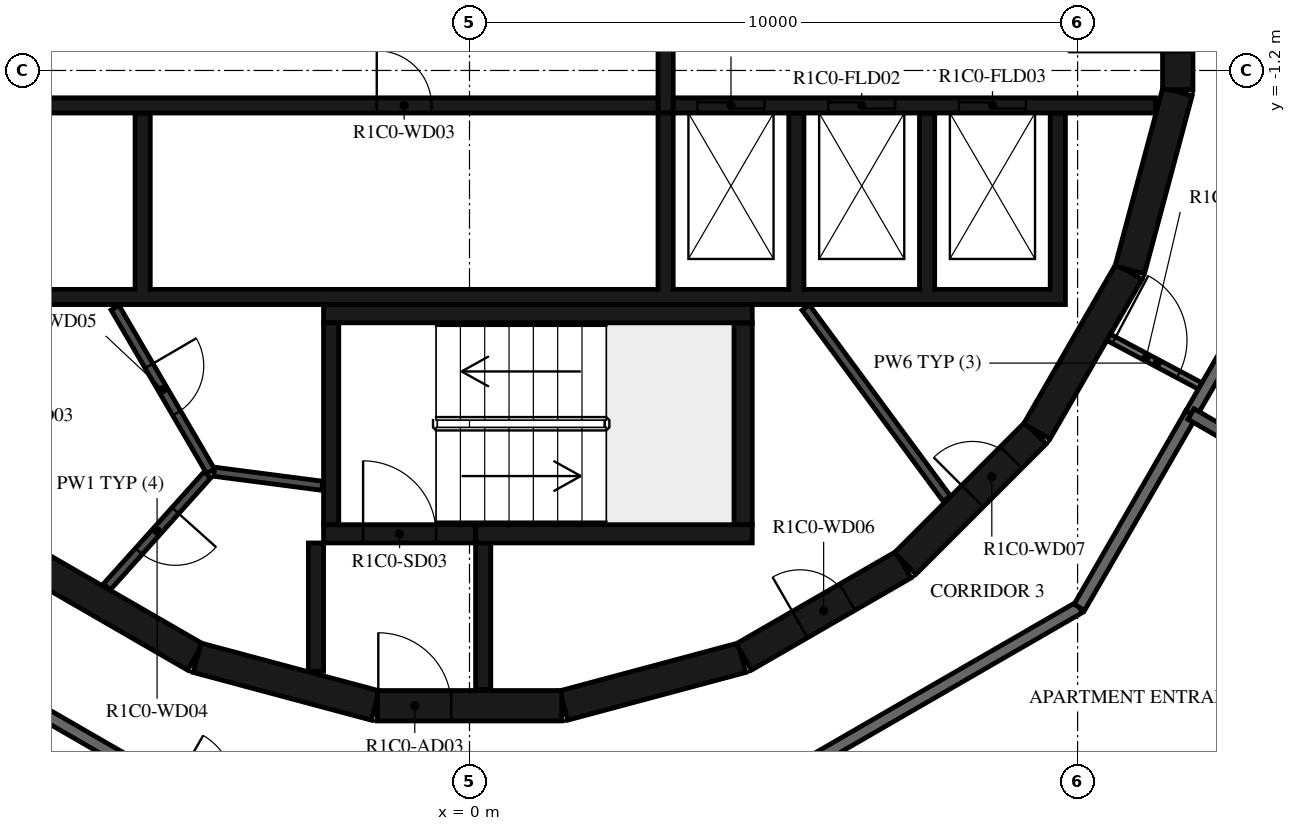
"""IFC4 building model, lengths in metres.
Left out: names, types, materials, properties, quantities, classifications, styles, units other than length and angle.
Written with IfcOpenShell. Run it as: python <this file> out.ifc"""

import sys

from ifc_helpers import new_model, si_unit, direction, frame, frame_2d, origin, place, context, subcontext, project, spatial, polyline, rectangle, outline, extrude, element, fill, save


model = new_model("IFC4")
c1 = context("Model", 3, precision=1e-05, world=origin(), true_north=direction((0.0, 1.0)))
c2 = subcontext(c1, "Body", "Model", "MODEL_VIEW")
j1 = project(units=[si_unit("LENGTHUNIT", "METRE"), si_unit("PLANEANGLEUNIT", "RADIAN")], contexts=[c1])
p1 = place(None, origin())
s1 = spatial("IfcSite", under=j1, at=p1, CompositionType="ELEMENT")
p2 = place(p1, origin())
s2 = spatial("IfcBuilding", under=s1, at=p2, CompositionType="ELEMENT")
p3 = place(p2, frame((0.0, 0.0, 66.4)))
s3 = spatial("IfcBuildingStorey", under=s2, at=p3, CompositionType="ELEMENT", Elevation=66.4)
p4 = place(p3, frame((1.55, -11.643, 0.0), z_axis=(0.0, 0.0, 1.0), x_axis=(0.965948410781, 0.258734743916, 0.0)))
e1 = element("IfcWall", 1, at=p4, inside=s3, PredefinedType="SHEAR", context=c2, shape_type="SweptSolid", body=[
    extrude(rectangle(XDim=3.033, YDim=0.5, at=frame_2d((1.516, 0.0))), origin(), (0.0, 0.0, 1.0), 3.05),
])
p5 = place(p3, frame((4.51, -10.845, 0.0), z_axis=(0.0, 0.0, 1.0), x_axis=(0.865975092491, 0.500087131594, 0.0)))
e2 = element("IfcWall", 2, at=p5, inside=s3, PredefinedType="SHEAR", context=c2, shape_type="SweptSolid", body=[
    extrude(rectangle(XDim=3.033, YDim=0.5, at=frame_2d((1.516, 0.0))), origin(), (0.0, 0.0, 1.0), 3.05),
])
p6 = place(p5, frame((1.066, 0.0, 0.0)))
e3 = element("IfcOpeningElement", 3, at=p6, cuts=e2, PredefinedType="OPENING", context=c2, shape_type="SweptSolid", body=[
    extrude(rectangle(XDim=0.9, YDim=2.1, at=frame_2d((0.45, 1.05))), frame((0.0, 0.26, 0.0), z_axis=(0.0, -1.0, 0.0), x_axis=(1.0, 0.0, 0.0)), (0.0, 0.0, 1.0), 0.52),
])
p7 = place(p3, frame((7.164, -9.308, 0.0), z_axis=(0.0, 0.0, 1.0), x_axis=(0.707106781187, 0.707106781187, 0.0)))
e4 = element("IfcWall", 4, at=p7, inside=s3, PredefinedType="SHEAR", context=c2, shape_type="SweptSolid", body=[
    extrude(rectangle(XDim=3.032, YDim=0.5, at=frame_2d((1.516, 0.0))), origin(), (0.0, 0.0, 1.0), 3.05),
])
p8 = place(p7, frame((1.566, 0.0, 0.0)))
e5 = element("IfcOpeningElement", 5, at=p8, cuts=e4, PredefinedType="OPENING", context=c2, shape_type="SweptSolid", body=[
    extrude(rectangle(XDim=0.9, YDim=2.1, at=frame_2d((0.45, 1.05))), frame((0.0, 0.26, 0.0), z_axis=(0.0, -1.0, 0.0), x_axis=(1.0, 0.0, 0.0)), (0.0, 0.0, 1.0), 0.52),
])
for number, where, z_axis, x_axis in (
    (6, (9.329, -7.137, 0.0), (0.0, 0.0, 1.0), (0.5, 0.866, 0.0)),
    (7, (10.858, -4.479, 0.0), (0.0, 0.0, 1.0), (0.259, 0.966, 0.0)),
):
    element("IfcWall", number, at=place(p3, frame(where, z_axis=z_axis, x_axis=x_axis)), inside=s3, PredefinedType="SHEAR", context=c2, shape_type="SweptSolid", body=[
        extrude(rectangle(XDim=3.033, YDim=0.5, at=frame_2d((1.516, 0.0))), origin(), (0.0, 0.0, 1.0), 3.05),
    ])
p9 = place(p3, frame((11.647, -1.516, 0.0), z_axis=(0.0, 0.0, 1.0), x_axis=(0.0, 1.0, 0.0)))
e8 = element("IfcWall", 8, at=p9, inside=s3, PredefinedType="SHEAR", context=c2, shape_type="SweptSolid", body=[
    extrude(rectangle(XDim=3.033, YDim=0.5, at=frame_2d((1.516, 0.0))), origin(), (0.0, 0.0, 1.0), 3.05),
])
p10 = place(p9, frame((0.616, 0.0, 0.0)))
e9 = element("IfcOpeningElement", 9, at=p10, cuts=e8, PredefinedType="OPENING", context=c2, shape_type="SweptSolid", body=[
    extrude(rectangle(XDim=1.8, YDim=2.1, at=frame_2d((0.9, 1.05))), frame((0.0, 0.26, 0.0), z_axis=(0.0, -1.0, 0.0), x_axis=(1.0, 0.0, 0.0)), (0.0, 0.0, 1.0), 0.52),
])
for number, where, z_axis, x_axis in (
    (10, (-7.137, -9.329, 0.0), (0.0, 0.0, 1.0), (0.866, -0.5, 0.0)),
    (11, (-4.479, -10.858, 0.0), (0.0, 0.0, 1.0), (0.966, -0.259, 0.0)),
):
    element("IfcWall", number, at=place(p3, frame(where, z_axis=z_axis, x_axis=x_axis)), inside=s3, PredefinedType="SHEAR", context=c2, shape_type="SweptSolid", body=[
        extrude(rectangle(XDim=3.033, YDim=0.5, at=frame_2d((1.516, 0.0))), origin(), (0.0, 0.0, 1.0), 3.05),
    ])
p11 = place(p3, frame((-1.516, -11.647, 0.0), z_axis=(0.0, 0.0, 1.0), x_axis=(1.0, 0.0, 0.0)))
e12 = element("IfcWall", 12, at=p11, inside=s3, PredefinedType="SHEAR", context=c2, shape_type="SweptSolid", body=[
    extrude(rectangle(XDim=3.033, YDim=0.5, at=frame_2d((1.516, 0.0))), origin(), (0.0, 0.0, 1.0), 3.05),
])
p12 = place(p11, frame((0.016, 0.0, 0.0)))
e13 = element("IfcOpeningElement", 13, at=p12, cuts=e12, PredefinedType="OPENING", context=c2, shape_type="SweptSolid", body=[
    extrude(rectangle(XDim=1.2, YDim=2.1, at=frame_2d((0.6, 1.05))), frame((0.0, 0.26, 0.0), z_axis=(0.0, -1.0, 0.0), x_axis=(1.0, 0.0, 0.0)), (0.0, 0.0, 1.0), 0.52),
])
p13 = place(p3, frame((-2.275, -8.67, 0.0), z_axis=(0.0, 0.0, 1.0), x_axis=(0.0, 1.0, 0.0)))
e14 = element("IfcWall", 14, at=p13, inside=s3, PredefinedType="SHEAR", context=c2, shape_type="SweptSolid", body=[
    extrude(rectangle(XDim=3.32, YDim=0.25, at=frame_2d((1.66, 0.0))), origin(), (0.0, 0.0, 1.0), 3.05),
])
p14 = place(p3, frame((-2.4, -5.2, 0.0), z_axis=(0.0, 0.0, 1.0), x_axis=(1.0, 0.0, 0.0)))
e15 = element("IfcWall", 15, at=p14, inside=s3, PredefinedType="SHEAR", context=c2, shape_type="SweptSolid", body=[
    extrude(rectangle(XDim=7.05, YDim=0.3, at=frame_2d((3.525, 0.0))), origin(), (0.0, 0.0, 1.0), 3.05),
])
p15 = place(p3, frame((4.5, -8.67, 0.0), z_axis=(0.0, 0.0, 1.0), x_axis=(0.0, 1.0, 0.0)))
e16 = element("IfcWall", 16, at=p15, inside=s3, PredefinedType="SHEAR", context=c2, shape_type="SweptSolid", body=[
    extrude(rectangle(XDim=3.32, YDim=0.3, at=frame_2d((1.66, 0.0))), origin(), (0.0, 0.0, 1.0), 3.05),
])
p16 = place(p3, frame((0.1, -8.82, 0.0), z_axis=(0.0, 0.0, 1.0), x_axis=(1.0, 0.0, 0.0)))
e17 = element("IfcWall", 17, at=p16, inside=s3, PredefinedType="SHEAR", context=c2, shape_type="SweptSolid", body=[
    extrude(rectangle(XDim=4.55, YDim=0.3, at=frame_2d((2.275, 0.0))), origin(), (0.0, 0.0, 1.0), 3.05),
])
p17 = place(p3, frame((-2.4, -8.82, 0.0), z_axis=(0.0, 0.0, 1.0), x_axis=(1.0, 0.0, 0.0)))
e18 = element("IfcWall", 18, at=p17, inside=s3, PredefinedType="SHEAR", context=c2, shape_type="SweptSolid", body=[
    extrude(rectangle(XDim=2.5, YDim=0.3, at=frame_2d((1.25, 0.0))), origin(), (0.0, 0.0, 1.0), 3.05),
])
p18 = place(p17, frame((0.65, 0.0, 0.0)))
e19 = element("IfcOpeningElement", 19, at=p18, cuts=e18, PredefinedType="OPENING", context=c2, shape_type="SweptSolid", body=[
    extrude(rectangle(XDim=1.2, YDim=2.1, at=frame_2d((0.6, 1.05))), frame((0.0, 0.16, 0.0), z_axis=(0.0, -1.0, 0.0), x_axis=(1.0, 0.0, 0.0)), (0.0, 0.0, 1.0), 0.32),
])
p19 = place(p3, frame((-2.525, -8.97, 0.0), z_axis=(0.0, 0.0, 1.0), x_axis=(0.0, -1.0, 0.0)))
e20 = element("IfcWall", 20, at=p19, inside=s3, PredefinedType="SHEAR", context=c2, shape_type="SweptSolid", body=[
    extrude(rectangle(XDim=2.11, YDim=0.25, at=frame_2d((1.055, 0.0))), origin(), (0.0, 0.0, 1.0), 3.05),
])
p20 = place(p3, frame((0.225, -8.97, 0.0), z_axis=(0.0, 0.0, 1.0), x_axis=(0.0, -1.0, 0.0)))
e21 = element("IfcWall", 21, at=p20, inside=s3, PredefinedType="SHEAR", context=c2, shape_type="SweptSolid", body=[
    extrude(rectangle(XDim=2.41, YDim=0.25, at=frame_2d((1.205, 0.0))), origin(), (0.0, 0.0, 1.0), 3.05),
])
p21 = place(p3, origin())
e22 = element("IfcWall", 22, at=p21, inside=s3, PredefinedType="SHEAR", context=c2, shape_type="SweptSolid", body=[
    extrude(outline(polyline([(9.8, -5.05), (9.8, -4.8), (9.8, -1.9), (9.55, -1.9), (9.55, -4.8), (7.65, -4.8), (7.65, -1.9), (7.4, -1.9), (7.4, -4.8), (5.5, -4.8), (5.5, -1.9), (5.25, -1.9), (5.25, -4.8), (3.35, -4.8), (3.35, -1.9), (3.1, -1.9), (3.1, -4.8), (-5.25, -4.8), (-5.25, -1.9), (-5.5, -1.9), (-5.5, -4.8), (-7.4, -4.8), (-7.4, -1.9), (-7.65, -1.9), (-7.65, -4.8), (-9.55, -4.8), (-9.55, -1.9), (-9.8, -1.9), (-9.8, -4.8), (-9.8, -5.05), (9.8, -5.05)])), origin(), (0.0, 0.0, 1.0), 3.05),
])
p22 = place(p3, frame((-11.28, -1.775, 0.0), z_axis=(0.0, 0.0, 1.0), x_axis=(1.0, 0.0, 0.0)))
e23 = element("IfcWall", 23, at=p22, inside=s3, PredefinedType="SHEAR", context=c2, shape_type="SweptSolid", body=[
    extrude(rectangle(XDim=14.38, YDim=0.25, at=frame_2d((7.19, 0.0))), origin(), (0.0, 0.0, 1.0), 3.05),
])
p23 = place(p22, frame((9.755, 0.0, 0.0)))
e24 = element("IfcOpeningElement", 24, at=p23, cuts=e23, PredefinedType="OPENING", context=c2, shape_type="SweptSolid", body=[
    extrude(rectangle(XDim=0.9, YDim=2.1, at=frame_2d((0.45, 1.05))), frame((0.0, 0.135, 0.0), z_axis=(0.0, -1.0, 0.0), x_axis=(1.0, 0.0, 0.0)), (0.0, 0.0, 1.0), 0.27),
])
p24 = place(p3, frame((3.35, -1.775, 0.0), z_axis=(0.0, 0.0, 1.0), x_axis=(1.0, 0.0, 0.0)))
e25 = element("IfcWall", 25, at=p24, inside=s3, PredefinedType="SHEAR", context=c2, shape_type="SweptSolid", body=[
    extrude(rectangle(XDim=7.93, YDim=0.25, at=frame_2d((3.965, 0.0))), origin(), (0.0, 0.0, 1.0), 3.05),
])
p25 = place(p24, frame((0.4, 0.0, 0.0)))
e26 = element("IfcOpeningElement", 26, at=p25, cuts=e25, PredefinedType="OPENING", context=c2, shape_type="SweptSolid", body=[
    extrude(rectangle(XDim=1.1, YDim=2.4, at=frame_2d((0.55, 1.2))), frame((0.0, 0.135, 0.0), z_axis=(0.0, -1.0, 0.0), x_axis=(1.0, 0.0, 0.0)), (0.0, 0.0, 1.0), 0.27),
])
p26 = place(p24, frame((2.55, 0.0, 0.0)))
e27 = element("IfcOpeningElement", 27, at=p26, cuts=e25, PredefinedType="OPENING", context=c2, shape_type="SweptSolid", body=[
    extrude(rectangle(XDim=1.1, YDim=2.4, at=frame_2d((0.55, 1.2))), frame((0.0, 0.135, 0.0), z_axis=(0.0, -1.0, 0.0), x_axis=(1.0, 0.0, 0.0)), (0.0, 0.0, 1.0), 0.27),
])
p27 = place(p24, frame((4.7, 0.0, 0.0)))
e28 = element("IfcOpeningElement", 28, at=p27, cuts=e25, PredefinedType="OPENING", context=c2, shape_type="SweptSolid", body=[
    extrude(rectangle(XDim=1.1, YDim=2.4, at=frame_2d((0.55, 1.2))), frame((0.0, 0.135, 0.0), z_axis=(0.0, -1.0, 0.0), x_axis=(1.0, 0.0, 0.0)), (0.0, 0.0, 1.0), 0.27),
])
p28 = place(p3, frame((3.225, -1.9, 0.0), z_axis=(0.0, 0.0, 1.0), x_axis=(0.0, 1.0, 0.0)))
e29 = element("IfcWall", 29, at=p28, inside=s3, PredefinedType="SHEAR", context=c2, shape_type="SweptSolid", body=[
    extrude(rectangle(XDim=3.8, YDim=0.25, at=frame_2d((1.9, 0.0))), origin(), (0.0, 0.0, 1.0), 3.05),
])
p29 = place(p3, frame((5.528, -5.098, 0.0), z_axis=(0.0, 0.0, 1.0), x_axis=(0.594034318069, -0.804439698769, 0.0)))
e30 = element("IfcWall", 30, at=p29, inside=s3, PredefinedType="PARTITIONING", context=c2, shape_type="SweptSolid", body=[
    extrude(rectangle(XDim=3.907, YDim=0.15, at=frame_2d((1.953, 0.0))), origin(), (0.0, 0.0, 1.0), 3.05),
])
p30 = place(p3, frame((-5.829, -5.102, 0.0), z_axis=(0.0, 0.0, 1.0), x_axis=(0.504480008384, -0.863423373057, 0.0)))
e31 = element("IfcWall", 31, at=p30, inside=s3, PredefinedType="PARTITIONING", context=c2, shape_type="SweptSolid", body=[
    extrude(rectangle(XDim=3.115, YDim=0.15, at=frame_2d((1.558, 0.0))), origin(), (0.0, 0.0, 1.0), 3.05),
])
p31 = place(p30, frame((1.107, 0.0, 0.0)))
e32 = element("IfcOpeningElement", 32, at=p31, cuts=e31, PredefinedType="OPENING", context=c2, shape_type="SweptSolid", body=[
    extrude(rectangle(XDim=0.9, YDim=2.1, at=frame_2d((0.45, 1.05))), frame((0.0, 0.085, 0.0), z_axis=(0.0, -1.0, 0.0), x_axis=(1.0, 0.0, 0.0)), (0.0, 0.0, 1.0), 0.17),
])
p32 = place(p3, frame((-4.311, -7.851, 0.0), z_axis=(0.0, 0.0, 1.0), x_axis=(-0.667869133096, -0.744278725383, 0.0)))
e33 = element("IfcWall", 33, at=p32, inside=s3, PredefinedType="PARTITIONING", context=c2, shape_type="SweptSolid", body=[
    extrude(rectangle(XDim=2.476, YDim=0.15, at=frame_2d((1.238, 0.0))), origin(), (0.0, 0.0, 1.0), 3.05),
])
p33 = place(p32, frame((0.788, 0.0, 0.0)))
e34 = element("IfcOpeningElement", 34, at=p33, cuts=e33, PredefinedType="OPENING", context=c2, shape_type="SweptSolid", body=[
    extrude(rectangle(XDim=0.9, YDim=2.1, at=frame_2d((0.45, 1.05))), frame((0.0, 0.085, 0.0), z_axis=(0.0, -1.0, 0.0), x_axis=(1.0, 0.0, 0.0)), (0.0, 0.0, 1.0), 0.17),
])
p34 = place(p3, frame((-4.198, -7.799, 0.0), z_axis=(0.0, 0.0, 1.0), x_axis=(0.991686747293, -0.128675542523, 0.0)))
e35 = element("IfcWall", 35, at=p34, inside=s3, PredefinedType="PARTITIONING", context=c2, shape_type="SweptSolid", body=[
    extrude(rectangle(XDim=1.793, YDim=0.15, at=frame_2d((0.896, 0.0))), origin(), (0.0, 0.0, 1.0), 3.05),
])
p35 = place(p3, frame((10.511, -5.589, 0.0), z_axis=(0.0, 0.0, 1.0), x_axis=(0.88294043061, -0.469485032769, 0.0)))
e36 = element("IfcWall", 36, at=p35, inside=s3, PredefinedType="PARTITIONING", context=c2, shape_type="SweptSolid", body=[
    extrude(rectangle(XDim=1.804, YDim=0.12, at=frame_2d((0.902, 0.0))), origin(), (0.0, 0.0, 1.0), 3.05),
])
p36 = place(p35, frame((0.1, 0.0, 0.0)))
e37 = element("IfcOpeningElement", 37, at=p36, cuts=e36, PredefinedType="OPENING", context=c2, shape_type="SweptSolid", body=[
    extrude(rectangle(XDim=1.2, YDim=2.1, at=frame_2d((0.6, 1.05))), frame((0.0, 0.07, 0.0), z_axis=(0.0, -1.0, 0.0), x_axis=(1.0, 0.0, 0.0)), (0.0, 0.0, 1.0), 0.14),
])
p37 = place(p3, frame((11.865, -6.85, 0.0), z_axis=(0.0, 0.0, 1.0), x_axis=(0.499987270552, 0.86603275301, 0.0)))
e38 = element("IfcWall", 38, at=p37, inside=s3, PredefinedType="STANDARD", context=c2, shape_type="SweptSolid", body=[
    extrude(rectangle(XDim=3.671, YDim=0.2, at=frame_2d((1.835, 0.0))), origin(), (0.0, 0.0, 1.0), 3.05),
])
p38 = place(p3, frame((-10.029, -10.029, 0.0), z_axis=(0.0, 0.0, 1.0), x_axis=(0.866022878987, -0.500004373052, 0.0)))
e39 = element("IfcWall", 39, at=p38, inside=s3, PredefinedType="STANDARD", context=c2, shape_type="SweptSolid", body=[
    extrude(rectangle(XDim=7.146, YDim=0.2, at=frame_2d((3.573, 0.0))), origin(), (0.0, 0.0, 1.0), 3.05),
])
p39 = place(p38, frame((5.947, 0.0, 0.0)))
e40 = element("IfcOpeningElement", 40, at=p39, cuts=e39, PredefinedType="OPENING", context=c2, shape_type="SweptSolid", body=[
    extrude(rectangle(XDim=1.0, YDim=2.1, at=frame_2d((0.5, 1.05))), frame((0.0, 0.11, 0.0), z_axis=(0.0, -1.0, 0.0), x_axis=(1.0, 0.0, 0.0)), (0.0, 0.0, 1.0), 0.22),
])
p40 = place(p3, frame((3.671, -13.7, 0.0), z_axis=(0.0, 0.0, 1.0), x_axis=(0.866024439905, 0.500001669485, 0.0)))
e41 = element("IfcWall", 41, at=p40, inside=s3, PredefinedType="STANDARD", context=c2, shape_type="SweptSolid", body=[
    extrude(rectangle(XDim=7.342, YDim=0.2, at=frame_2d((3.671, 0.0))), origin(), (0.0, 0.0, 1.0), 3.05),
])
p41 = place(p3, frame((10.029, -10.029, 0.0), z_axis=(0.0, 0.0, 1.0), x_axis=(0.50001606911, 0.866016126081, 0.0)))
e42 = element("IfcWall", 42, at=p41, inside=s3, PredefinedType="STANDARD", context=c2, shape_type="SweptSolid", body=[
    extrude(rectangle(XDim=3.671, YDim=0.2, at=frame_2d((1.835, 0.0))), origin(), (0.0, 0.0, 1.0), 3.05),
])
p42 = place(p3, frame((16.817, -9.709, 0.0), z_axis=(0.0, 0.0, 1.0), x_axis=(-0.86604338933, 0.499968846828, 0.0)))
e43 = element("IfcWall", 43, at=p42, inside=s3, PredefinedType="STANDARD", context=c2, shape_type="SweptSolid", body=[
    extrude(rectangle(XDim=5.718, YDim=0.2, at=frame_2d((2.859, 0.0))), origin(), (0.0, 0.0, 1.0), 3.05),
])
p43 = place(p3, frame((-11.127, -11.127, 0.0), z_axis=(0.0, 0.0, 1.0), x_axis=(0.866034514313, -0.499984219769, 0.0)))
e44 = element("IfcWall", 44, at=p43, inside=s3, PredefinedType="PARTITIONING", context=c2, shape_type="SweptSolid", body=[
    extrude(rectangle(XDim=5.006, YDim=0.12, at=frame_2d((2.503, 0.0))), origin(), (0.0, 0.0, 1.0), 3.05),
])
p44 = place(p43, frame((0.2, 0.0, 0.0)))
e45 = element("IfcOpeningElement", 45, at=p44, cuts=e44, PredefinedType="OPENING", context=c2, shape_type="SweptSolid", body=[
    extrude(rectangle(XDim=0.9, YDim=2.1, at=frame_2d((0.45, 1.05))), frame((0.0, 0.07, 0.0), z_axis=(0.0, -1.0, 0.0), x_axis=(1.0, 0.0, 0.0)), (0.0, 0.0, 1.0), 0.14),
])
p45 = place(p18, origin())
e46 = element("IfcDoor", 46, at=p45, inside=s3, OperationType="SINGLE_SWING_LEFT", PredefinedType="DOOR", context=c2, shape_type="SweptSolid", body=[
    extrude(rectangle(XDim=1.2, YDim=2.1, at=frame_2d((0.6, 1.05))), frame((0.0, 0.025, 0.0), z_axis=(0.0, -1.0, 0.0), x_axis=(1.0, 0.0, 0.0)), (0.0, 0.0, 1.0), 0.05),
])
fill(e19, e46)
p46 = place(p12, origin())
e47 = element("IfcDoor", 47, at=p46, inside=s3, OperationType="SINGLE_SWING_RIGHT", PredefinedType="DOOR", context=c2, shape_type="SweptSolid", body=[
    extrude(rectangle(XDim=1.2, YDim=2.1, at=frame_2d((0.6, 1.05))), frame((0.0, 0.025, 0.0), z_axis=(0.0, -1.0, 0.0), x_axis=(1.0, 0.0, 0.0)), (0.0, 0.0, 1.0), 0.05),
])
fill(e13, e47)
p47 = place(p10, origin())
e48 = element("IfcDoor", 48, at=p47, inside=s3, OperationType="DOUBLE_DOOR_SINGLE_SWING", PredefinedType="DOOR", context=c2, shape_type="SweptSolid", body=[
    extrude(rectangle(XDim=1.8, YDim=2.1, at=frame_2d((0.9, 1.05))), frame((0.0, 0.025, 0.0), z_axis=(0.0, -1.0, 0.0), x_axis=(1.0, 0.0, 0.0)), (0.0, 0.0, 1.0), 0.05),
])
fill(e9, e48)
p48 = place(p25, origin())
e49 = element("IfcDoor", 49, at=p48, inside=s3, OperationType="DOUBLE_DOOR_SLIDING", PredefinedType="DOOR", context=c2, shape_type="SweptSolid", body=[
    extrude(rectangle(XDim=1.1, YDim=2.4, at=frame_2d((0.55, 1.2))), frame((0.0, 0.025, 0.0), z_axis=(0.0, -1.0, 0.0), x_axis=(1.0, 0.0, 0.0)), (0.0, 0.0, 1.0), 0.05),
])
fill(e26, e49)
p49 = place(p26, origin())
e50 = element("IfcDoor", 50, at=p49, inside=s3, OperationType="DOUBLE_DOOR_SLIDING", PredefinedType="DOOR", context=c2, shape_type="SweptSolid", body=[
    extrude(rectangle(XDim=1.1, YDim=2.4, at=frame_2d((0.55, 1.2))), frame((0.0, 0.025, 0.0), z_axis=(0.0, -1.0, 0.0), x_axis=(1.0, 0.0, 0.0)), (0.0, 0.0, 1.0), 0.05),
])
fill(e27, e50)
p50 = place(p27, origin())
e51 = element("IfcDoor", 51, at=p50, inside=s3, OperationType="DOUBLE_DOOR_SLIDING", PredefinedType="DOOR", context=c2, shape_type="SweptSolid", body=[
    extrude(rectangle(XDim=1.1, YDim=2.4, at=frame_2d((0.55, 1.2))), frame((0.0, 0.025, 0.0), z_axis=(0.0, -1.0, 0.0), x_axis=(1.0, 0.0, 0.0)), (0.0, 0.0, 1.0), 0.05),
])
fill(e28, e51)
p51 = place(p23, origin())
e52 = element("IfcDoor", 52, at=p51, inside=s3, OperationType="SINGLE_SWING_RIGHT", PredefinedType="DOOR", context=c2, shape_type="SweptSolid", body=[
    extrude(rectangle(XDim=0.9, YDim=2.1, at=frame_2d((0.45, 1.05))), frame((0.0, 0.025, 0.0), z_axis=(0.0, -1.0, 0.0), x_axis=(1.0, 0.0, 0.0)), (0.0, 0.0, 1.0), 0.05),
])
fill(e24, e52)
p52 = place(p33, origin())
e53 = element("IfcDoor", 53, at=p52, inside=s3, OperationType="SINGLE_SWING_LEFT", PredefinedType="DOOR", context=c2, shape_type="SweptSolid", body=[
    extrude(rectangle(XDim=0.9, YDim=2.1, at=frame_2d((0.45, 1.05))), frame((0.0, 0.025, 0.0), z_axis=(0.0, -1.0, 0.0), x_axis=(1.0, 0.0, 0.0)), (0.0, 0.0, 1.0), 0.05),
])
fill(e34, e53)
p53 = place(p31, origin())
e54 = element("IfcDoor", 54, at=p53, inside=s3, OperationType="SINGLE_SWING_RIGHT", PredefinedType="DOOR", context=c2, shape_type="SweptSolid", body=[
    extrude(rectangle(XDim=0.9, YDim=2.1, at=frame_2d((0.45, 1.05))), frame((0.0, 0.025, 0.0), z_axis=(0.0, -1.0, 0.0), x_axis=(1.0, 0.0, 0.0)), (0.0, 0.0, 1.0), 0.05),
])
fill(e32, e54)
p54 = place(p6, origin())
e55 = element("IfcDoor", 55, at=p54, inside=s3, OperationType="SINGLE_SWING_LEFT", PredefinedType="DOOR", context=c2, shape_type="SweptSolid", body=[
    extrude(rectangle(XDim=0.9, YDim=2.1, at=frame_2d((0.45, 1.05))), frame((0.0, 0.025, 0.0), z_axis=(0.0, -1.0, 0.0), x_axis=(1.0, 0.0, 0.0)), (0.0, 0.0, 1.0), 0.05),
])
fill(e3, e55)
p55 = place(p8, origin())
e56 = element("IfcDoor", 56, at=p55, inside=s3, OperationType="SINGLE_SWING_RIGHT", PredefinedType="DOOR", context=c2, shape_type="SweptSolid", body=[
    extrude(rectangle(XDim=0.9, YDim=2.1, at=frame_2d((0.45, 1.05))), frame((0.0, 0.025, 0.0), z_axis=(0.0, -1.0, 0.0), x_axis=(1.0, 0.0, 0.0)), (0.0, 0.0, 1.0), 0.05),
])
fill(e5, e56)
p56 = place(p36, origin())
e57 = element("IfcDoor", 57, at=p56, inside=s3, OperationType="DOUBLE_DOOR_SINGLE_SWING", PredefinedType="DOOR", context=c2, shape_type="SweptSolid", body=[
    extrude(rectangle(XDim=1.2, YDim=2.1, at=frame_2d((0.6, 1.05))), frame((0.0, 0.025, 0.0), z_axis=(0.0, -1.0, 0.0), x_axis=(1.0, 0.0, 0.0)), (0.0, 0.0, 1.0), 0.05),
])
fill(e37, e57)
save(model, sys.argv[1])
